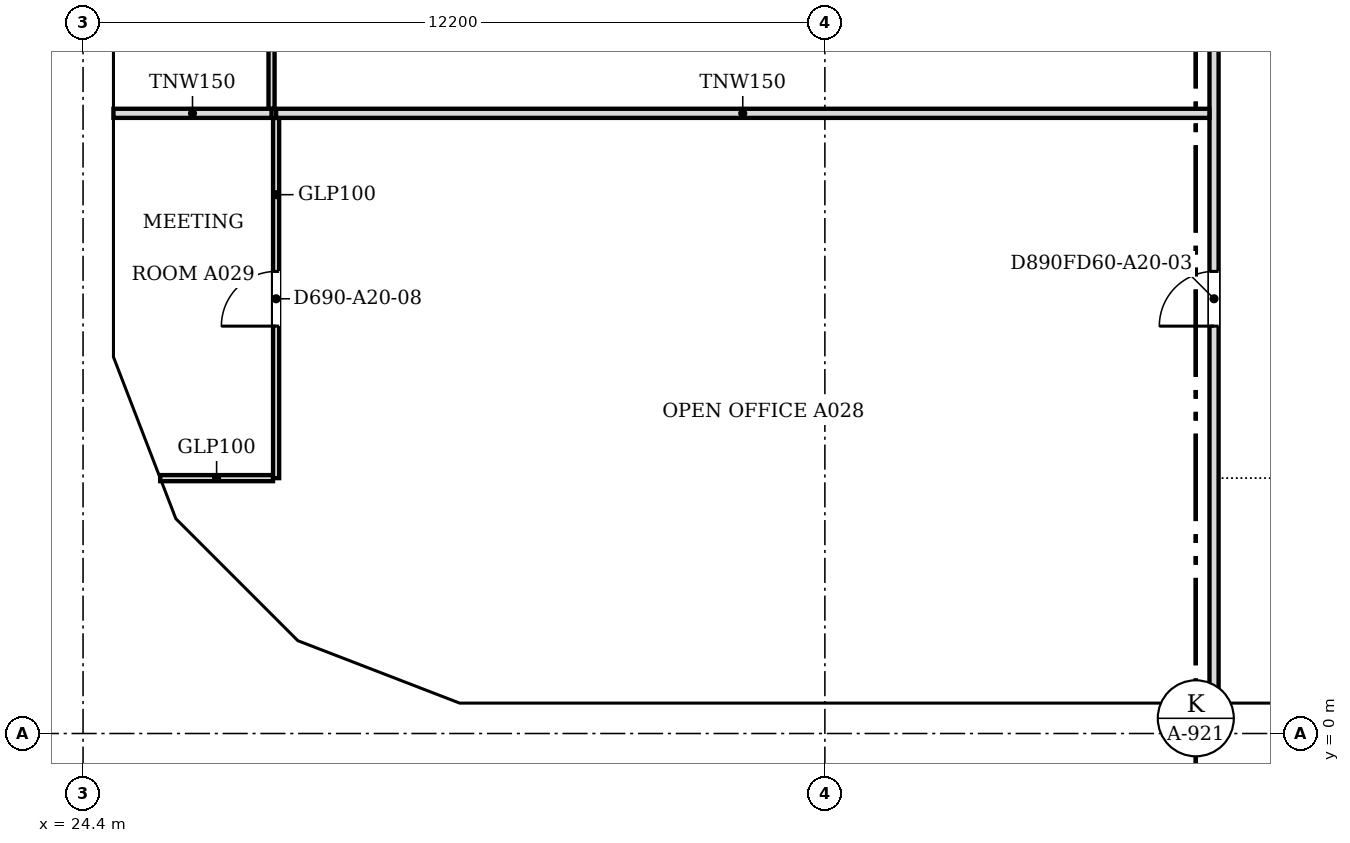
"""IFC4 building model, lengths in metres.
Left out: names, types, materials, properties, quantities, classifications, styles, units other than length and angle.
Written with IfcOpenShell. Run it as: python <this file> out.ifc"""

import sys

from ifc_helpers import new_model, si_unit, direction, frame, frame_2d, origin, place, context, subcontext, project, spatial, polyline, rectangle, outline, extrude, faceted_brep, source, transform, mapped, element, fill, save


model = new_model("IFC4")
c1 = context("Model", 3, precision=1e-05, world=origin(), true_north=direction((0.0, 1.0)))
c2 = subcontext(c1, "Body", "Model", "MODEL_VIEW")
j1 = project(units=[si_unit("LENGTHUNIT", "METRE"), si_unit("PLANEANGLEUNIT", "RADIAN")], contexts=[c1])
p1 = place(None, origin())
s1 = spatial("IfcSite", under=j1, at=p1, CompositionType="ELEMENT")
p2 = place(p1, origin())
s2 = spatial("IfcBuilding", under=s1, at=p2, CompositionType="ELEMENT")
p3 = place(p2, frame((0.0, 0.0, 228.3)))
s3 = spatial("IfcBuildingStorey", under=s2, at=p3, CompositionType="ELEMENT", Elevation=228.3)
m1 = source(origin(), c2, "Body", "Brep", [
    faceted_brep([(0.047, -0.25, 0.0), (3.05, -0.25, 3.8), (0.047, -0.25, 7.6), (0.0, -0.25, 7.54), (0.0, -0.25, 0.06), (0.093, 0.25, 7.541), (3.05, 0.25, 3.8), (0.093, 0.25, 0.059), (0.047, 0.0, 0.0), (0.047, 0.0, 7.6)], [[[0, 1, 2, 3, 4]], [[5, 6, 7]], [[7, 6, 1, 0, 8]], [[6, 5, 9, 2, 1]], [[3, 2, 9]], [[8, 0, 4]], [[7, 8, 4, 3, 9, 5]]]),
])
p4 = place(p3, frame((30.5, 0.25, -3.8), z_axis=(0.0, 0.0, 1.0), x_axis=(1.0, 0.0, 0.0)))
e1 = element("IfcWall", 1, at=p4, inside=s3, PredefinedType="SOLIDWALL", context=c2, shape_type="MappedRepresentation", body=[
    mapped(m1, transform((0.0, 0.0, 0.0), scale=1.0)),
])
m2 = source(origin(), c2, "Body", "SweptSolid", [
    extrude(outline(polyline([(0.247, 0.656), (2.731, 3.8), (0.247, 6.944), (0.247, 0.656)])), frame((0.0, 0.26, 0.0), z_axis=(0.0, -1.0, 0.0), x_axis=(1.0, 0.0, 0.0)), (0.0, 0.0, 1.0), 0.52),
])
p5 = place(p4, origin())
e2 = element("IfcOpeningElement", 2, at=p5, cuts=e1, PredefinedType="OPENING", context=c2, shape_type="MappedRepresentation", body=[
    mapped(m2, transform((0.0, 0.0, 0.0), scale=1.0)),
])
m3 = source(origin(), c2, "Body", "Brep", [
    faceted_brep([(2.95, -0.25, 0.0), (2.997, -0.25, 0.059), (2.997, -0.25, 7.541), (2.95, -0.25, 7.6), (0.0, -0.25, 3.8), (0.053, 0.25, 3.868), (2.904, 0.25, 7.54), (2.904, 0.25, 0.06), (0.053, 0.25, 3.732), (2.95, 0.0, 0.0), (2.95, 0.0, 7.6), (0.0, 0.0, 3.8)], [[[0, 1, 2, 3, 4]], [[5, 6, 7, 8]], [[1, 0, 9]], [[10, 3, 2]], [[6, 5, 11, 4, 3, 10]], [[8, 7, 9, 0, 4, 11]], [[8, 11, 5]], [[1, 9, 7, 6, 10, 2]]]),
])
p6 = place(p3, frame((27.794, 1.312, -3.8), z_axis=(0.0, 0.0, 1.0), x_axis=(0.932973525033, -0.359944998003, 0.0)))
e3 = element("IfcWall", 3, at=p6, inside=s3, PredefinedType="SOLIDWALL", context=c2, shape_type="MappedRepresentation", body=[
    mapped(m3, transform((0.0, 0.0, 0.0), scale=1.0)),
])
m4 = source(origin(), c2, "Body", "SweptSolid", [
    extrude(outline(polyline([(2.75, 6.935), (0.316, 3.8), (2.75, 0.665), (2.75, 6.935)])), frame((0.0, 0.26, 0.0), z_axis=(0.0, -1.0, 0.0), x_axis=(1.0, 0.0, 0.0)), (0.0, 0.0, 1.0), 0.52),
])
p7 = place(p6, origin())
e4 = element("IfcOpeningElement", 4, at=p7, cuts=e3, PredefinedType="OPENING", context=c2, shape_type="MappedRepresentation", body=[
    mapped(m4, transform((0.0, 0.0, 0.0), scale=1.0)),
])
m5 = source(origin(), c2, "Body", "Brep", [
    faceted_brep([(3.05, -0.25, 0.0), (6.1, -0.25, 3.8), (6.1, -0.25, 3.8), (3.05, -0.25, 7.6), (0.0, -0.25, 3.8), (0.0, 0.25, 3.8), (3.05, 0.25, 7.6), (6.1, 0.25, 3.8), (6.1, 0.25, 3.8), (3.05, 0.25, 0.0)], [[[0, 1, 2, 3, 4]], [[5, 6, 7, 8, 9]], [[9, 8, 1, 0]], [[7, 6, 3, 2]], [[6, 5, 4, 3]], [[5, 9, 0, 4]], [[1, 8, 7, 2]]]),
])
p8 = place(p3, frame((33.55, 0.25, -3.8), z_axis=(0.0, 0.0, 1.0), x_axis=(1.0, 0.0, 0.0)))
e5 = element("IfcWall", 5, at=p8, inside=s3, PredefinedType="SOLIDWALL", context=c2, shape_type="MappedRepresentation", body=[
    mapped(m5, transform((0.0, 0.0, 0.0), scale=1.0)),
])
m6 = source(origin(), c2, "Body", "SweptSolid", [
    extrude(outline(polyline([(3.05, 0.399), (5.78, 3.8), (3.05, 7.201), (0.321, 3.8), (3.05, 0.399)])), frame((0.0, 0.26, 0.0), z_axis=(0.0, -1.0, 0.0), x_axis=(1.0, 0.0, 0.0)), (0.0, 0.0, 1.0), 0.52),
])
p9 = place(p8, origin())
e6 = element("IfcOpeningElement", 6, at=p9, cuts=e5, PredefinedType="OPENING", context=c2, shape_type="MappedRepresentation", body=[
    mapped(m6, transform((0.0, 0.0, 0.0), scale=1.0)),
])
m7 = source(origin(), c2, "Body", "SweptSolid", [
    extrude(outline(polyline([(3.05, 0.0), (6.1, 3.8), (3.05, 7.6), (0.0, 3.8), (3.05, 0.0)])), frame((0.0, 0.25, 0.0), z_axis=(0.0, -1.0, 0.0), x_axis=(1.0, 0.0, 0.0)), (0.0, 0.0, 1.0), 0.5),
])
p10 = place(p3, frame((39.65, 0.25, -3.8), z_axis=(0.0, 0.0, 1.0), x_axis=(1.0, 0.0, 0.0)))
e7 = element("IfcWall", 7, at=p10, inside=s3, PredefinedType="SOLIDWALL", context=c2, shape_type="MappedRepresentation", body=[
    mapped(m7, transform((0.0, 0.0, 0.0), scale=1.0)),
])
p11 = place(p10, origin())
e8 = element("IfcOpeningElement", 8, at=p11, cuts=e7, PredefinedType="OPENING", context=c2, shape_type="MappedRepresentation", body=[
    mapped(m6, transform((0.0, 0.0, 0.0), scale=1.0)),
])
m8 = source(origin(), c2, "Body", "Brep", [
    faceted_brep([(3.096, -0.25, 0.0), (6.1, -0.25, 3.8), (3.096, -0.25, 7.6), (0.047, -0.25, 3.857), (0.047, -0.25, 3.743), (0.0, 0.25, 3.8), (3.096, 0.25, 7.6), (6.053, 0.25, 3.859), (6.053, 0.25, 3.741), (3.096, 0.25, 0.0), (6.1, -0.0, 3.8), (0.0, 0.0, 3.8)], [[[0, 1, 2, 3, 4]], [[5, 6, 7, 8, 9]], [[9, 8, 10, 1, 0]], [[7, 6, 2, 1, 10]], [[6, 5, 11, 3, 2]], [[5, 9, 0, 4, 11]], [[11, 4, 3]], [[10, 8, 7]]]),
])
p12 = place(p3, frame((24.65, 12.247, -3.8), z_axis=(0.0, 0.0, 1.0), x_axis=(0.0, -1.0, 0.0)))
e9 = element("IfcWall", 9, at=p12, inside=s3, PredefinedType="SOLIDWALL", context=c2, shape_type="MappedRepresentation", body=[
    mapped(m8, transform((0.0, 0.0, 0.0), scale=1.0)),
])
m9 = source(origin(), c2, "Body", "SweptSolid", [
    extrude(outline(polyline([(3.094, 0.399), (5.781, 3.8), (3.094, 7.201), (0.323, 3.8), (3.094, 0.399)])), frame((0.0, 0.26, 0.0), z_axis=(0.0, -1.0, 0.0), x_axis=(1.0, 0.0, 0.0)), (0.0, 0.0, 1.0), 0.52),
])
p13 = place(p12, origin())
e10 = element("IfcOpeningElement", 10, at=p13, cuts=e9, PredefinedType="OPENING", context=c2, shape_type="MappedRepresentation", body=[
    mapped(m9, transform((0.0, 0.0, 0.0), scale=1.0)),
])
m10 = source(origin(), c2, "Body", "Brep", [
    faceted_brep([(2.95, -0.25, 0.0), (3.003, -0.25, 0.068), (3.003, -0.25, 7.532), (2.95, -0.25, 7.6), (0.0, -0.25, 3.8), (0.047, 0.25, 3.86), (2.898, 0.25, 7.532), (2.898, 0.25, 0.068), (0.047, 0.25, 3.74), (2.95, 0.0, 0.0), (2.95, 0.0, 7.6), (0.0, 0.0, 3.8)], [[[0, 1, 2, 3, 4]], [[5, 6, 7, 8]], [[1, 0, 9]], [[10, 3, 2]], [[6, 5, 11, 4, 3, 10]], [[8, 7, 9, 0, 4, 11]], [[8, 11, 5]], [[1, 9, 7, 6, 10, 2]]]),
])
p14 = place(p3, frame((24.65, 6.146, -3.8), z_axis=(0.0, 0.0, 1.0), x_axis=(0.359953949349, -0.932970071518, 0.0)))
e11 = element("IfcWall", 11, at=p14, inside=s3, PredefinedType="SOLIDWALL", context=c2, shape_type="MappedRepresentation", body=[
    mapped(m10, transform((0.0, 0.0, 0.0), scale=1.0)),
])
p15 = place(p14, origin())
e12 = element("IfcOpeningElement", 12, at=p15, cuts=e11, PredefinedType="OPENING", context=c2, shape_type="MappedRepresentation", body=[
    mapped(m4, transform((0.0, 0.0, 0.0), scale=1.0)),
])
m11 = source(origin(), c2, "Body", "Brep", [
    faceted_brep([(0.053, -0.25, 0.0), (2.997, -0.25, 3.8), (0.053, -0.25, 7.6), (0.0, -0.25, 7.532), (0.0, -0.25, 0.068), (0.106, 0.25, 7.532), (2.944, 0.25, 3.868), (2.944, 0.25, 3.732), (0.106, 0.25, 0.068), (2.997, 0.0, 3.8), (0.053, 0.0, 0.0), (0.053, 0.0, 7.6)], [[[0, 1, 2, 3, 4]], [[5, 6, 7, 8]], [[8, 7, 9, 1, 0, 10]], [[6, 5, 11, 2, 1, 9]], [[3, 2, 11]], [[10, 0, 4]], [[8, 10, 4, 3, 11, 5]], [[9, 7, 6]]]),
])
p16 = place(p3, frame((25.675, 3.431, -3.8), z_axis=(0.0, 0.0, 1.0), x_axis=(0.707106781187, -0.707106781187, 0.0)))
e13 = element("IfcWall", 13, at=p16, inside=s3, PredefinedType="SOLIDWALL", context=c2, shape_type="MappedRepresentation", body=[
    mapped(m11, transform((0.0, 0.0, 0.0), scale=1.0)),
])
m12 = source(origin(), c2, "Body", "SweptSolid", [
    extrude(outline(polyline([(0.253, 0.666), (2.681, 3.8), (0.253, 6.934), (0.253, 0.666)])), frame((0.0, 0.26, 0.0), z_axis=(0.0, -1.0, 0.0), x_axis=(1.0, 0.0, 0.0)), (0.0, 0.0, 1.0), 0.52),
])
p17 = place(p16, origin())
e14 = element("IfcOpeningElement", 14, at=p17, cuts=e13, PredefinedType="OPENING", context=c2, shape_type="MappedRepresentation", body=[
    mapped(m12, transform((0.0, 0.0, 0.0), scale=1.0)),
])
m13 = source(origin(), c2, "Body", "Brep", [
    faceted_brep([(3.003, -0.25, 0.0), (6.053, -0.25, 3.8), (0.0, -0.25, 3.8), (0.047, 0.25, 3.8), (6.053, 0.25, 3.8), (3.003, 0.25, 0.0), (0.047, 0.25, 3.741), (0.0, 0.0, 3.8)], [[[0, 1, 2]], [[3, 4, 5, 6]], [[5, 4, 1, 0]], [[4, 3, 7, 2, 1]], [[6, 5, 0, 2, 7]], [[6, 7, 3]]]),
])
p18 = place(p3, frame((30.547, 0.25, 0.0), z_axis=(0.0, 0.0, 1.0), x_axis=(1.0, 0.0, 0.0)))
e15 = element("IfcWall", 15, at=p18, inside=s3, PredefinedType="SOLIDWALL", context=c2, shape_type="MappedRepresentation", body=[
    mapped(m13, transform((0.0, 0.0, 0.0), scale=1.0)),
])
m14 = source(origin(), c2, "Body", "SweptSolid", [
    extrude(outline(polyline([(3.005, 0.401), (5.532, 3.55), (0.516, 3.55), (3.005, 0.401)])), frame((0.0, 0.26, 0.0), z_axis=(0.0, -1.0, 0.0), x_axis=(1.0, 0.0, 0.0)), (0.0, 0.0, 1.0), 0.52),
])
p19 = place(p18, origin())
e16 = element("IfcOpeningElement", 16, at=p19, cuts=e15, PredefinedType="OPENING", context=c2, shape_type="MappedRepresentation", body=[
    mapped(m14, transform((0.0, 0.0, 0.0), scale=1.0)),
])
m15 = source(origin(), c2, "Body", "Brep", [
    faceted_brep([(3.05, -0.25, 0.0), (6.1, -0.25, 3.8), (6.1, -0.25, 3.8), (0.0, -0.25, 3.8), (0.0, 0.25, 3.8), (6.1, 0.25, 3.8), (6.1, 0.25, 3.8), (3.05, 0.25, 0.0)], [[[0, 1, 2, 3]], [[4, 5, 6, 7]], [[7, 6, 1, 0]], [[5, 4, 3, 2]], [[4, 7, 0, 3]], [[1, 6, 5, 2]]]),
])
p20 = place(p3, frame((36.6, 0.25, 0.0), z_axis=(0.0, 0.0, 1.0), x_axis=(1.0, 0.0, 0.0)))
e17 = element("IfcWall", 17, at=p20, inside=s3, PredefinedType="SOLIDWALL", context=c2, shape_type="MappedRepresentation", body=[
    mapped(m15, transform((0.0, 0.0, 0.0), scale=1.0)),
])
m16 = source(origin(), c2, "Body", "SweptSolid", [
    extrude(outline(polyline([(3.05, 0.399), (5.579, 3.55), (0.521, 3.55), (3.05, 0.399)])), frame((0.0, 0.26, 0.0), z_axis=(0.0, -1.0, 0.0), x_axis=(1.0, 0.0, 0.0)), (0.0, 0.0, 1.0), 0.52),
])
p21 = place(p20, origin())
e18 = element("IfcOpeningElement", 18, at=p21, cuts=e17, PredefinedType="OPENING", context=c2, shape_type="MappedRepresentation", body=[
    mapped(m16, transform((0.0, 0.0, 0.0), scale=1.0)),
])
m17 = source(origin(), c2, "Body", "SweptSolid", [
    extrude(outline(polyline([(3.05, 0.0), (6.1, 3.8), (0.0, 3.8), (3.05, 0.0)])), frame((0.0, 0.25, 0.0), z_axis=(0.0, -1.0, 0.0), x_axis=(1.0, 0.0, 0.0)), (0.0, 0.0, 1.0), 0.5),
])
p22 = place(p3, frame((42.7, 0.25, 0.0), z_axis=(0.0, 0.0, 1.0), x_axis=(1.0, 0.0, 0.0)))
e19 = element("IfcWall", 19, at=p22, inside=s3, PredefinedType="SOLIDWALL", context=c2, shape_type="MappedRepresentation", body=[
    mapped(m17, transform((0.0, 0.0, 0.0), scale=1.0)),
])
p23 = place(p22, origin())
e20 = element("IfcOpeningElement", 20, at=p23, cuts=e19, PredefinedType="OPENING", context=c2, shape_type="MappedRepresentation", body=[
    mapped(m16, transform((0.0, 0.0, 0.0), scale=1.0)),
])
m18 = source(origin(), c2, "Body", "Brep", [
    faceted_brep([(0.093, -0.25, 0.057), (3.143, -0.25, 3.8), (0.093, -0.25, 3.8), (0.0, 0.25, 3.8), (3.143, 0.25, 3.8), (0.047, 0.25, 0.0), (0.0, 0.25, 0.056), (0.047, 0.0, 0.0)], [[[0, 1, 2]], [[3, 4, 5, 6]], [[5, 4, 1, 0, 7]], [[4, 3, 2, 1]], [[6, 5, 7]], [[6, 7, 0, 2, 3]]]),
])
p24 = place(p3, frame((24.65, 12.293, 0.0), z_axis=(0.0, 0.0, 1.0), x_axis=(0.0, -1.0, 0.0)))
e21 = element("IfcWall", 21, at=p24, inside=s3, PredefinedType="SOLIDWALL", context=c2, shape_type="MappedRepresentation", body=[
    mapped(m18, transform((0.0, 0.0, 0.0), scale=1.0)),
])
m19 = source(origin(), c2, "Body", "SweptSolid", [
    extrude(outline(polyline([(0.247, 0.641), (2.617, 3.55), (0.247, 3.55), (0.247, 0.641)])), frame((0.0, 0.26, 0.0), z_axis=(0.0, -1.0, 0.0), x_axis=(1.0, 0.0, 0.0)), (0.0, 0.0, 1.0), 0.52),
])
p25 = place(p24, origin())
e22 = element("IfcOpeningElement", 22, at=p25, cuts=e21, PredefinedType="OPENING", context=c2, shape_type="MappedRepresentation", body=[
    mapped(m19, transform((0.0, 0.0, 0.0), scale=1.0)),
])
m20 = source(origin(), c2, "Body", "Brep", [
    faceted_brep([(3.003, -0.25, 0.0), (3.05, -0.25, 0.06), (3.05, -0.25, 3.8), (0.0, -0.25, 3.8), (0.0, 0.25, 3.8), (2.957, 0.25, 3.8), (2.957, 0.25, 0.059), (3.003, 0.0, 0.0)], [[[0, 1, 2, 3]], [[4, 5, 6]], [[1, 0, 7]], [[5, 4, 3, 2]], [[4, 6, 7, 0, 3]], [[1, 7, 6, 5, 2]]]),
])
p26 = place(p3, frame((24.65, 9.15, 0.0), z_axis=(0.0, 0.0, 1.0), x_axis=(0.0, -1.0, 0.0)))
e23 = element("IfcWall", 23, at=p26, inside=s3, PredefinedType="SOLIDWALL", context=c2, shape_type="MappedRepresentation", body=[
    mapped(m20, transform((0.0, 0.0, 0.0), scale=1.0)),
])
m21 = source(origin(), c2, "Body", "SweptSolid", [
    extrude(outline(polyline([(2.803, 3.55), (0.516, 3.55), (2.803, 0.656), (2.803, 3.55)])), frame((0.0, 0.26, 0.0), z_axis=(0.0, -1.0, 0.0), x_axis=(1.0, 0.0, 0.0)), (0.0, 0.0, 1.0), 0.52),
])
p27 = place(p26, origin())
e24 = element("IfcOpeningElement", 24, at=p27, cuts=e23, PredefinedType="OPENING", context=c2, shape_type="MappedRepresentation", body=[
    mapped(m21, transform((0.0, 0.0, 0.0), scale=1.0)),
])
m22 = source(origin(), c2, "Body", "Brep", [
    faceted_brep([(0.047, -0.25, 0.0), (2.997, -0.25, 3.8), (0.0, -0.25, 3.8), (0.0, -0.25, 0.059), (0.093, 0.25, 3.8), (2.944, 0.25, 3.8), (2.944, 0.25, 3.732), (0.093, 0.25, 0.06), (2.997, 0.0, 3.8), (0.047, 0.0, 0.0)], [[[0, 1, 2, 3]], [[4, 5, 6, 7]], [[7, 6, 8, 1, 0, 9]], [[5, 4, 2, 1, 8]], [[9, 0, 3]], [[7, 9, 3, 2, 4]], [[6, 5, 8]]]),
])
p28 = place(p3, frame((24.633, 6.19, 0.0), z_axis=(0.0, 0.0, 1.0), x_axis=(0.359901446078, -0.932990326376, 0.0)))
e25 = element("IfcWall", 25, at=p28, inside=s3, PredefinedType="SOLIDWALL", context=c2, shape_type="MappedRepresentation", body=[
    mapped(m22, transform((0.0, 0.0, 0.0), scale=1.0)),
])
m23 = source(origin(), c2, "Body", "SweptSolid", [
    extrude(outline(polyline([(0.247, 0.665), (2.487, 3.55), (0.247, 3.55), (0.247, 0.665)])), frame((0.0, 0.26, 0.0), z_axis=(0.0, -1.0, 0.0), x_axis=(1.0, 0.0, 0.0)), (0.0, 0.0, 1.0), 0.52),
])
p29 = place(p28, origin())
e26 = element("IfcOpeningElement", 26, at=p29, cuts=e25, PredefinedType="OPENING", context=c2, shape_type="MappedRepresentation", body=[
    mapped(m23, transform((0.0, 0.0, 0.0), scale=1.0)),
])
m24 = source(origin(), c2, "Body", "Brep", [
    faceted_brep([(2.944, -0.25, 0.0), (2.997, -0.25, 0.068), (2.997, -0.25, 3.8), (0.0, -0.25, 3.8), (0.053, 0.25, 3.8), (2.891, 0.25, 3.8), (2.891, 0.25, 0.068), (0.053, 0.25, 3.732), (2.944, 0.0, 0.0), (0.0, 0.0, 3.8)], [[[0, 1, 2, 3]], [[4, 5, 6, 7]], [[1, 0, 8]], [[5, 4, 9, 3, 2]], [[7, 6, 8, 0, 3, 9]], [[7, 9, 4]], [[1, 8, 6, 5, 2]]]),
])
p30 = place(p3, frame((25.712, 3.394, 0.0), z_axis=(0.0, 0.0, 1.0), x_axis=(0.707066050402, -0.707147509625, 0.0)))
e27 = element("IfcWall", 27, at=p30, inside=s3, PredefinedType="SOLIDWALL", context=c2, shape_type="MappedRepresentation", body=[
    mapped(m24, transform((0.0, 0.0, 0.0), scale=1.0)),
])
m25 = source(origin(), c2, "Body", "SweptSolid", [
    extrude(outline(polyline([(2.744, 3.55), (0.51, 3.55), (2.744, 0.666), (2.744, 3.55)])), frame((0.0, 0.26, 0.0), z_axis=(0.0, -1.0, 0.0), x_axis=(1.0, 0.0, 0.0)), (0.0, 0.0, 1.0), 0.52),
])
p31 = place(p30, origin())
e28 = element("IfcOpeningElement", 28, at=p31, cuts=e27, PredefinedType="OPENING", context=c2, shape_type="MappedRepresentation", body=[
    mapped(m25, transform((0.0, 0.0, 0.0), scale=1.0)),
])
m26 = source(origin(), c2, "Body", "Brep", [
    faceted_brep([(0.053, -0.25, 0.0), (3.003, -0.25, 3.8), (0.0, -0.25, 3.8), (0.0, -0.25, 0.068), (0.106, 0.25, 3.8), (2.957, 0.25, 3.8), (2.957, 0.25, 3.74), (0.106, 0.25, 0.068), (3.003, 0.0, 3.8), (0.053, 0.0, 0.0)], [[[0, 1, 2, 3]], [[4, 5, 6, 7]], [[7, 6, 8, 1, 0, 9]], [[5, 4, 2, 1, 8]], [[9, 0, 3]], [[7, 9, 3, 2, 4]], [[6, 5, 8]]]),
])
p32 = place(p3, frame((27.744, 1.331, 0.0), z_axis=(0.0, 0.0, 1.0), x_axis=(0.932970071518, -0.359953949349, 0.0)))
e29 = element("IfcWall", 29, at=p32, inside=s3, PredefinedType="SOLIDWALL", context=c2, shape_type="MappedRepresentation", body=[
    mapped(m26, transform((0.0, 0.0, 0.0), scale=1.0)),
])
m27 = source(origin(), c2, "Body", "SweptSolid", [
    extrude(outline(polyline([(0.253, 0.665), (2.493, 3.55), (0.253, 3.55), (0.253, 0.665)])), frame((0.0, 0.26, 0.0), z_axis=(0.0, -1.0, 0.0), x_axis=(1.0, 0.0, 0.0)), (0.0, 0.0, 1.0), 0.52),
])
p33 = place(p32, origin())
e30 = element("IfcOpeningElement", 30, at=p33, cuts=e29, PredefinedType="OPENING", context=c2, shape_type="MappedRepresentation", body=[
    mapped(m27, transform((0.0, 0.0, 0.0), scale=1.0)),
])
p34 = place(p3, frame((43.0, 0.5, 0.0), z_axis=(0.0, 0.0, 1.0), x_axis=(0.0, 1.0, 0.0)))
e31 = element("IfcWall", 31, at=p34, inside=s3, PredefinedType="PARTITIONING", context=c2, shape_type="SweptSolid", body=[
    extrude(rectangle(XDim=21.424, YDim=0.15, at=frame_2d((10.712, 0.0))), origin(), (0.0, 0.0, 1.0), 2.888),
])
m28 = source(origin(), c2, "Body", "SweptSolid", [
    extrude(rectangle(XDim=0.9, YDim=2.1, at=frame_2d((0.45, 1.05))), frame((0.0, 0.085, 0.0), z_axis=(0.0, -1.0, 0.0), x_axis=(1.0, 0.0, 0.0)), (0.0, 0.0, 1.0), 0.17),
])
p35 = place(p34, frame((6.2, 0.0, 0.0)))
e32 = element("IfcOpeningElement", 32, at=p35, cuts=e31, PredefinedType="OPENING", context=c2, shape_type="MappedRepresentation", body=[
    mapped(m28, transform((0.0, 0.0, 0.0), scale=1.0)),
])
p36 = place(p34, frame((15.1, 0.0, 0.0)))
e33 = element("IfcOpeningElement", 33, at=p36, cuts=e31, PredefinedType="OPENING", context=c2, shape_type="MappedRepresentation", body=[
    mapped(m28, transform((0.0, 0.0, 0.0), scale=1.0)),
])
p37 = place(p3, frame((25.669, 4.2, 0.0), z_axis=(0.0, 0.0, 1.0), x_axis=(1.0, 0.0, 0.0)))
e34 = element("IfcWall", 34, at=p37, inside=s3, PredefinedType="PARTITIONING", context=c2, shape_type="SweptSolid", body=[
    extrude(rectangle(XDim=1.855, YDim=0.1, at=frame_2d((0.928, 0.0))), origin(), (0.0, 0.0, 1.0), 2.888),
])
p38 = place(p3, frame((27.575, 4.2, 0.0), z_axis=(0.0, 0.0, 1.0), x_axis=(0.0, 1.0, 0.0)))
e35 = element("IfcWall", 35, at=p38, inside=s3, PredefinedType="PARTITIONING", context=c2, shape_type="SweptSolid", body=[
    extrude(rectangle(XDim=5.924, YDim=0.1, at=frame_2d((2.962, 0.0))), origin(), (0.0, 0.0, 1.0), 2.888),
])
m29 = source(origin(), c2, "Body", "SweptSolid", [
    extrude(rectangle(XDim=0.9, YDim=2.1, at=frame_2d((0.45, 1.05))), frame((0.0, 0.06, 0.0), z_axis=(0.0, -1.0, 0.0), x_axis=(1.0, 0.0, 0.0)), (0.0, 0.0, 1.0), 0.12),
])
p39 = place(p38, frame((2.5, 0.0, 0.0)))
e36 = element("IfcOpeningElement", 36, at=p39, cuts=e35, PredefinedType="OPENING", context=c2, shape_type="MappedRepresentation", body=[
    mapped(m29, transform((0.0, 0.0, 0.0), scale=1.0)),
])
p40 = place(p3, frame((24.9, 10.2, 0.0), z_axis=(0.0, 0.0, 1.0), x_axis=(1.0, 0.0, 0.0)))
e37 = element("IfcWall", 37, at=p40, inside=s3, PredefinedType="PARTITIONING", context=c2, shape_type="SweptSolid", body=[
    extrude(rectangle(XDim=2.6, YDim=0.15, at=frame_2d((1.3, 0.0))), origin(), (0.0, 0.0, 1.0), 2.888),
])
p41 = place(p3, frame((27.575, 10.2, 0.0), z_axis=(0.0, 0.0, 1.0), x_axis=(1.0, 0.0, 0.0)))
e38 = element("IfcWall", 38, at=p41, inside=s3, PredefinedType="PARTITIONING", context=c2, shape_type="SweptSolid", body=[
    extrude(rectangle(XDim=15.349, YDim=0.15, at=frame_2d((7.675, 0.0))), origin(), (0.0, 0.0, 1.0), 2.888),
])
p42 = place(p3, frame((27.5, 10.276, 0.0), z_axis=(0.0, 0.0, 1.0), x_axis=(0.0, 1.0, 0.0)))
e39 = element("IfcWall", 39, at=p42, inside=s3, PredefinedType="PARTITIONING", context=c2, shape_type="SweptSolid", body=[
    extrude(rectangle(XDim=8.448, YDim=0.1, at=frame_2d((4.224, 0.0))), origin(), (0.0, 0.0, 1.0), 2.888),
])
p43 = place(p42, frame((3.8, 0.0, 0.0)))
e40 = element("IfcOpeningElement", 40, at=p43, cuts=e39, PredefinedType="OPENING", context=c2, shape_type="MappedRepresentation", body=[
    mapped(m29, transform((0.0, 0.0, 0.0), scale=1.0)),
])
m30 = source(origin(), c2, "Body", "SweptSolid", [
    extrude(rectangle(XDim=0.9, YDim=2.1, at=frame_2d((0.45, 1.05))), frame((0.0, 0.025, 0.0), z_axis=(0.0, -1.0, 0.0), x_axis=(1.0, 0.0, 0.0)), (0.0, 0.0, 1.0), 0.05),
])
p44 = place(p35, origin())
e41 = element("IfcDoor", 41, at=p44, inside=s3, OperationType="SINGLE_SWING_LEFT", PredefinedType="DOOR", context=c2, shape_type="MappedRepresentation", body=[
    mapped(m30, transform((0.0, 0.0, 0.0), scale=1.0)),
])
fill(e32, e41)
p45 = place(p39, origin())
e42 = element("IfcDoor", 42, at=p45, inside=s3, OperationType="SINGLE_SWING_LEFT", PredefinedType="DOOR", context=c2, shape_type="MappedRepresentation", body=[
    mapped(m30, transform((0.0, 0.0, 0.0), scale=1.0)),
])
fill(e36, e42)
save(model, sys.argv[1])
